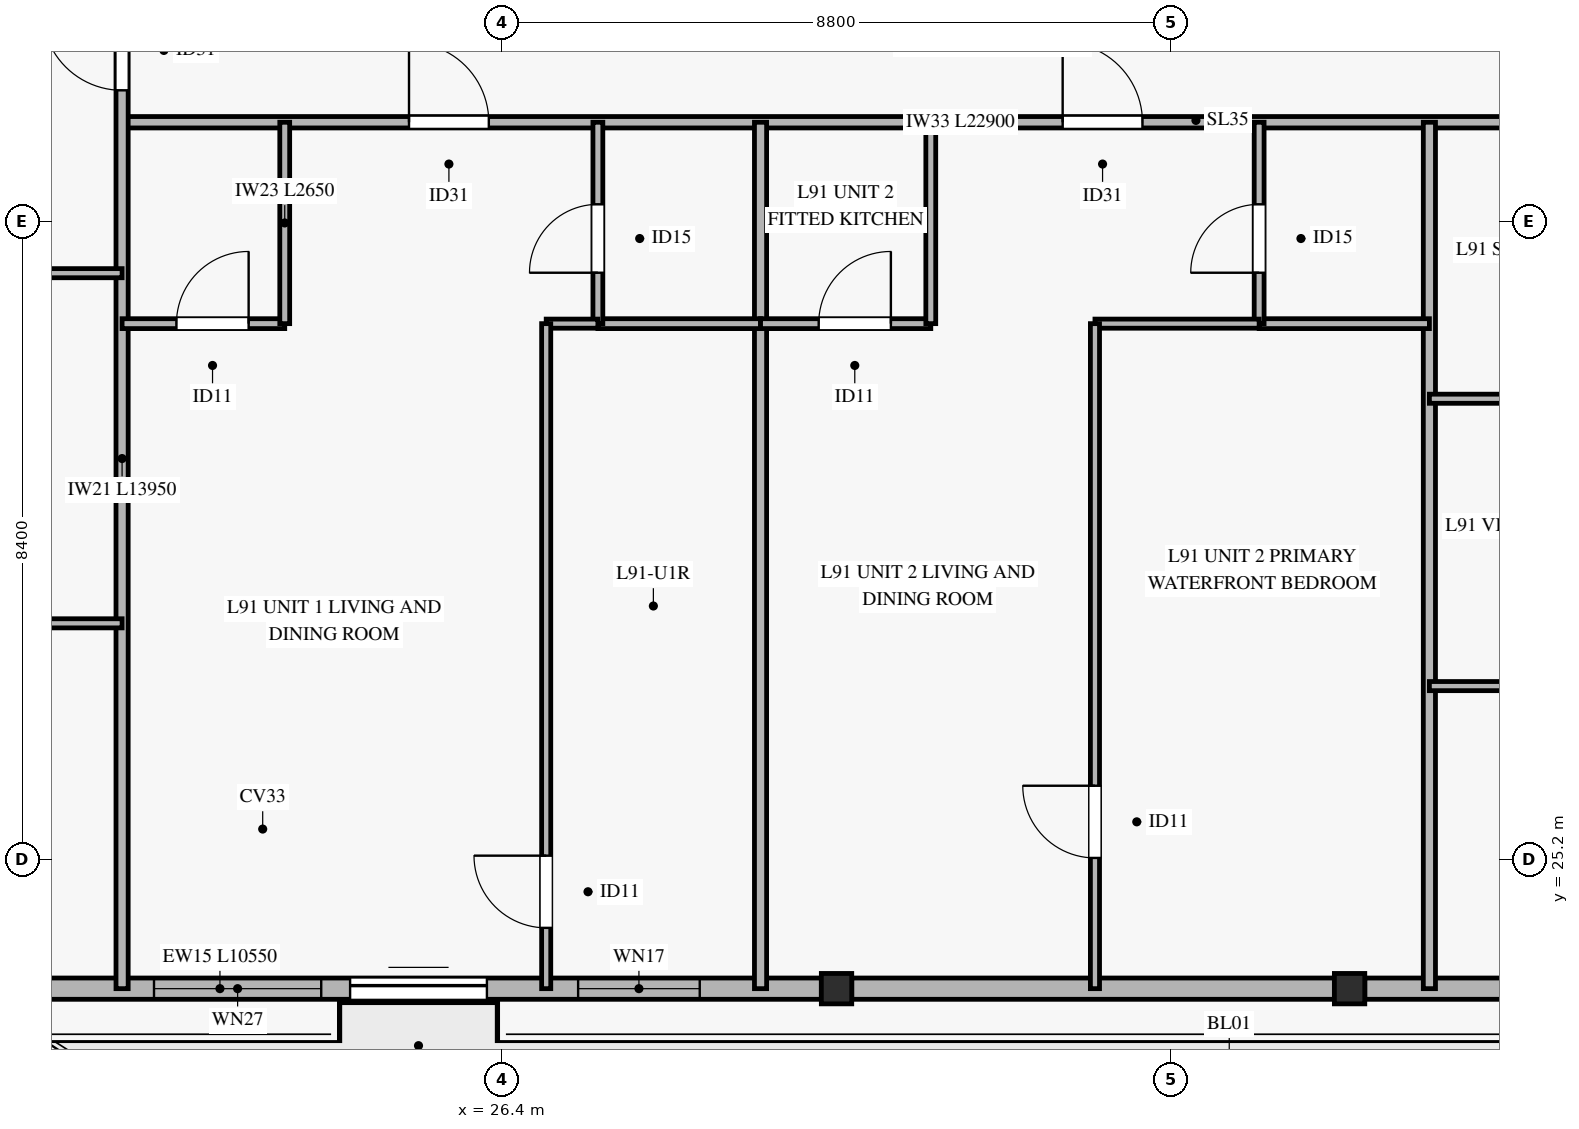
"""IFC4 building model, lengths in metres.
Left out: names, types, materials, properties, quantities, classifications, styles, units other than length and angle.
Written with IfcOpenShell. Run it as: python <this file> out.ifc"""

import sys

from ifc_helpers import new_model, si_unit, direction, frame, frame_2d, origin, origin_2d, place, context, subcontext, project, spatial, rectangle, hollow_rectangle, extrude, source, transform, mapped, element, fill, save


model = new_model("IFC4")
c1 = context("Model", 3, precision=1e-05, world=origin(), true_north=direction((0.0, 1.0)))
c2 = subcontext(c1, "Body", "Model", "MODEL_VIEW")
j1 = project(units=[si_unit("LENGTHUNIT", "METRE"), si_unit("PLANEANGLEUNIT", "RADIAN")], contexts=[c1])
p1 = place(None, origin())
s1 = spatial("IfcSite", under=j1, at=p1, CompositionType="ELEMENT")
p2 = place(p1, origin())
s2 = spatial("IfcBuilding", under=s1, at=p2, CompositionType="ELEMENT")
p3 = place(p2, frame((0.0, 0.0, 349.3)))
s3 = spatial("IfcBuildingStorey", under=s2, at=p3, CompositionType="ELEMENT", Elevation=349.3)
m1 = source(origin(), c2, "Body", "SweptSolid", [
    extrude(hollow_rectangle(XDim=0.4, YDim=0.4, WallThickness=0.02, at=origin_2d()), origin(), (0.0, 0.0, 1.0), 3.08),
])
for number, where, z_axis, x_axis in (
    (1, (30.8, 23.5, 0.0), (0.0, 0.0, 1.0), (1.0, 0.0, 0.0)),
    (2, (37.55, 23.5, 0.0), (0.0, 0.0, 1.0), (1.0, 0.0, 0.0)),
):
    element("IfcColumn", number, at=place(p3, frame(where, z_axis=z_axis, x_axis=x_axis)), inside=s3, PredefinedType="COLUMN", context=c2, shape_type="MappedRepresentation", body=[
        mapped(m1, transform((0.0, 0.0, 0.0), x_axis=(1.0, 0.0, 0.0), y_axis=(0.0, 1.0, 0.0), z_axis=(0.0, 0.0, 1.0), scale=1.0)),
    ])
p4 = place(p3, frame((20.05, 23.5, 0.0), z_axis=(0.0, 0.0, 1.0), x_axis=(1.0, 0.0, 0.0)))
e3 = element("IfcWall", 3, at=p4, inside=s3, PredefinedType="SOLIDWALL", context=c2, shape_type="SweptSolid", body=[
    extrude(rectangle(XDim=10.55, YDim=0.28, at=frame_2d((5.275, 0.0))), origin(), (0.0, 0.0, 1.0), 2.71),
])
p5 = place(p4, frame((4.35, 0.0, 0.0)))
e4 = element("IfcOpeningElement", 4, at=p5, cuts=e3, PredefinedType="OPENING", context=c2, shape_type="SweptSolid", body=[
    extrude(rectangle(XDim=1.8, YDim=2.25, at=frame_2d((0.9, 1.125))), frame((0.0, 0.15, 0.0), z_axis=(0.0, -1.0, 0.0), x_axis=(1.0, 0.0, 0.0)), (0.0, 0.0, 1.0), 0.3),
])
p6 = place(p4, frame((1.77, 0.0, 0.35)))
e5 = element("IfcOpeningElement", 5, at=p6, cuts=e3, PredefinedType="OPENING", context=c2, shape_type="SweptSolid", body=[
    extrude(rectangle(XDim=2.2, YDim=2.1, at=frame_2d((1.1, 1.05))), frame((0.0, 0.15, 0.0), z_axis=(0.0, -1.0, 0.0), x_axis=(1.0, 0.0, 0.0)), (0.0, 0.0, 1.0), 0.3),
])
p7 = place(p4, frame((7.35, 0.0, 0.35)))
e6 = element("IfcOpeningElement", 6, at=p7, cuts=e3, PredefinedType="OPENING", context=c2, shape_type="SweptSolid", body=[
    extrude(rectangle(XDim=1.6, YDim=2.0, at=frame_2d((0.8, 1.0))), frame((0.0, 0.15, 0.0), z_axis=(0.0, -1.0, 0.0), x_axis=(1.0, 0.0, 0.0)), (0.0, 0.0, 1.0), 0.3),
])
for number, where, z_axis, x_axis in (
    (7, (31.0, 23.5, 0.0), (0.0, 0.0, 1.0), (1.0, 0.0, 0.0)),
    (8, (37.75, 23.5, 0.0), (0.0, 0.0, 1.0), (1.0, 0.0, 0.0)),
):
    element("IfcWall", number, at=place(p3, frame(where, z_axis=z_axis, x_axis=x_axis)), inside=s3, PredefinedType="SOLIDWALL", context=c2, shape_type="SweptSolid", body=[
        extrude(rectangle(XDim=6.35, YDim=0.28, at=frame_2d((3.175, 0.0))), origin(), (0.0, 0.0, 1.0), 2.71),
    ])
p8 = place(p3, frame((21.4, 34.9, 0.0), z_axis=(0.0, 0.0, 1.0), x_axis=(1.0, 0.0, 0.0)))
e9 = element("IfcWall", 9, at=p8, inside=s3, PredefinedType="PARTITIONING", context=c2, shape_type="SweptSolid", body=[
    extrude(rectangle(XDim=22.9, YDim=0.15, at=frame_2d((11.45, 0.0))), origin(), (0.0, 0.0, 1.0), 2.365),
])
p9 = place(p8, frame((3.775, 0.0, 0.0)))
e10 = element("IfcOpeningElement", 10, at=p9, cuts=e9, PredefinedType="OPENING", context=c2, shape_type="SweptSolid", body=[
    extrude(rectangle(XDim=1.05, YDim=2.15, at=frame_2d((0.525, 1.075))), frame((0.0, 0.085, 0.0), z_axis=(0.0, -1.0, 0.0), x_axis=(1.0, 0.0, 0.0)), (0.0, 0.0, 1.0), 0.17),
])
p10 = place(p8, frame((12.375, 0.0, 0.0)))
e11 = element("IfcOpeningElement", 11, at=p10, cuts=e9, PredefinedType="OPENING", context=c2, shape_type="SweptSolid", body=[
    extrude(rectangle(XDim=1.05, YDim=2.15, at=frame_2d((0.525, 1.075))), frame((0.0, 0.085, 0.0), z_axis=(0.0, -1.0, 0.0), x_axis=(1.0, 0.0, 0.0)), (0.0, 0.0, 1.0), 0.17),
])
p11 = place(p8, frame((19.535, 0.0, 0.0)))
e12 = element("IfcOpeningElement", 12, at=p11, cuts=e9, PredefinedType="OPENING", context=c2, shape_type="SweptSolid", body=[
    extrude(rectangle(XDim=1.05, YDim=2.15, at=frame_2d((0.525, 1.075))), frame((0.0, 0.085, 0.0), z_axis=(0.0, -1.0, 0.0), x_axis=(1.0, 0.0, 0.0)), (0.0, 0.0, 1.0), 0.17),
])
p12 = place(p3, frame((21.4, 23.5, 0.0), z_axis=(0.0, 0.0, 1.0), x_axis=(0.0, 1.0, 0.0)))
e13 = element("IfcWall", 13, at=p12, inside=s3, PredefinedType="PARTITIONING", context=c2, shape_type="SweptSolid", body=[
    extrude(rectangle(XDim=13.95, YDim=0.16, at=frame_2d((6.975, 0.0))), origin(), (0.0, 0.0, 1.0), 2.665),
])
p13 = place(p12, frame((11.82, 0.0, 0.0)))
e14 = element("IfcOpeningElement", 14, at=p13, cuts=e13, PredefinedType="OPENING", context=c2, shape_type="SweptSolid", body=[
    extrude(rectangle(XDim=1.05, YDim=2.15, at=frame_2d((0.525, 1.075))), frame((0.0, 0.09, 0.0), z_axis=(0.0, -1.0, 0.0), x_axis=(1.0, 0.0, 0.0)), (0.0, 0.0, 1.0), 0.18),
])
for number, where, z_axis, x_axis in (
    (15, (29.8, 23.5, 0.0), (0.0, 0.0, 1.0), (0.0, 1.0, 0.0)),
    (16, (38.6, 23.5, 0.0), (0.0, 0.0, 1.0), (0.0, 1.0, 0.0)),
):
    element("IfcWall", number, at=place(p3, frame(where, z_axis=z_axis, x_axis=x_axis)), inside=s3, PredefinedType="PARTITIONING", context=c2, shape_type="SweptSolid", body=[
        extrude(rectangle(XDim=11.4, YDim=0.16, at=frame_2d((5.7, 0.0))), origin(), (0.0, 0.0, 1.0), 2.665),
    ])
p14 = place(p3, frame((12.1, 28.307, 0.0), z_axis=(0.0, 0.0, 1.0), x_axis=(1.0, 0.0, 0.0)))
e17 = element("IfcWall", 17, at=p14, inside=s3, PredefinedType="PARTITIONING", context=c2, shape_type="SweptSolid", body=[
    extrude(rectangle(XDim=9.3, YDim=0.12, at=frame_2d((4.65, 0.0))), origin(), (0.0, 0.0, 1.0), 2.365),
])
p15 = place(p14, frame((4.006, 0.0, 0.0)))
e18 = element("IfcOpeningElement", 18, at=p15, cuts=e17, PredefinedType="OPENING", context=c2, shape_type="SweptSolid", body=[
    extrude(rectangle(XDim=0.95, YDim=2.1, at=frame_2d((0.475, 1.05))), frame((0.0, 0.07, 0.0), z_axis=(0.0, -1.0, 0.0), x_axis=(1.0, 0.0, 0.0)), (0.0, 0.0, 1.0), 0.14),
])
p16 = place(p3, frame((12.1, 32.914, 0.0), z_axis=(0.0, 0.0, 1.0), x_axis=(1.0, 0.0, 0.0)))
e19 = element("IfcWall", 19, at=p16, inside=s3, PredefinedType="PARTITIONING", context=c2, shape_type="SweptSolid", body=[
    extrude(rectangle(XDim=9.3, YDim=0.12, at=frame_2d((4.65, 0.0))), origin(), (0.0, 0.0, 1.0), 2.365),
])
p17 = place(p16, frame((4.006, 0.0, 0.0)))
e20 = element("IfcOpeningElement", 20, at=p17, cuts=e19, PredefinedType="OPENING", context=c2, shape_type="SweptSolid", body=[
    extrude(rectangle(XDim=0.95, YDim=2.1, at=frame_2d((0.475, 1.05))), frame((0.0, 0.07, 0.0), z_axis=(0.0, -1.0, 0.0), x_axis=(1.0, 0.0, 0.0)), (0.0, 0.0, 1.0), 0.14),
])
p18 = place(p3, frame((21.4, 32.25, 0.0), z_axis=(0.0, 0.0, 1.0), x_axis=(1.0, 0.0, 0.0)))
e21 = element("IfcWall", 21, at=p18, inside=s3, PredefinedType="PARTITIONING", context=c2, shape_type="SweptSolid", body=[
    extrude(rectangle(XDim=2.14, YDim=0.13, at=frame_2d((1.07, 0.0))), origin(), (0.0, 0.0, 1.0), 3.08),
])
p19 = place(p18, frame((0.715, 0.0, 0.0)))
e22 = element("IfcOpeningElement", 22, at=p19, cuts=e21, PredefinedType="OPENING", context=c2, shape_type="SweptSolid", body=[
    extrude(rectangle(XDim=0.95, YDim=2.1, at=frame_2d((0.475, 1.05))), frame((0.0, 0.075, 0.0), z_axis=(0.0, -1.0, 0.0), x_axis=(1.0, 0.0, 0.0)), (0.0, 0.0, 1.0), 0.15),
])
p20 = place(p3, frame((23.54, 32.25, 0.0), z_axis=(0.0, 0.0, 1.0), x_axis=(0.0, 1.0, 0.0)))
e23 = element("IfcWall", 23, at=p20, inside=s3, PredefinedType="PARTITIONING", context=c2, shape_type="SweptSolid", body=[
    extrude(rectangle(XDim=2.65, YDim=0.13, at=frame_2d((1.325, 0.0))), origin(), (0.0, 0.0, 1.0), 2.665),
])
p21 = place(p3, frame((27.66, 32.25, 0.0), z_axis=(0.0, 0.0, 1.0), x_axis=(1.0, 0.0, 0.0)))
e24 = element("IfcWall", 24, at=p21, inside=s3, PredefinedType="PARTITIONING", context=c2, shape_type="SweptSolid", body=[
    extrude(rectangle(XDim=2.14, YDim=0.13, at=frame_2d((1.07, 0.0))), origin(), (0.0, 0.0, 1.0), 3.08),
])
p22 = place(p3, frame((27.66, 32.25, 0.0), z_axis=(0.0, 0.0, 1.0), x_axis=(0.0, 1.0, 0.0)))
e25 = element("IfcWall", 25, at=p22, inside=s3, PredefinedType="PARTITIONING", context=c2, shape_type="SweptSolid", body=[
    extrude(rectangle(XDim=2.65, YDim=0.13, at=frame_2d((1.325, 0.0))), origin(), (0.0, 0.0, 1.0), 2.665),
])
p23 = place(p22, frame((0.67, 0.0, 0.0)))
e26 = element("IfcOpeningElement", 26, at=p23, cuts=e25, PredefinedType="OPENING", context=c2, shape_type="SweptSolid", body=[
    extrude(rectangle(XDim=0.9, YDim=2.1, at=frame_2d((0.45, 1.05))), frame((0.0, 0.075, 0.0), z_axis=(0.0, -1.0, 0.0), x_axis=(1.0, 0.0, 0.0)), (0.0, 0.0, 1.0), 0.15),
])
p24 = place(p3, frame((26.98, 32.25, 0.0), z_axis=(0.0, 0.0, 1.0), x_axis=(1.0, 0.0, 0.0)))
e27 = element("IfcWall", 27, at=p24, inside=s3, PredefinedType="PARTITIONING", context=c2, shape_type="SweptSolid", body=[
    extrude(rectangle(XDim=0.68, YDim=0.12, at=frame_2d((0.34, 0.0))), origin(), (0.0, 0.0, 1.0), 3.08),
])
p25 = place(p3, frame((26.98, 23.5, 0.0), z_axis=(0.0, 0.0, 1.0), x_axis=(0.0, 1.0, 0.0)))
e28 = element("IfcWall", 28, at=p25, inside=s3, PredefinedType="PARTITIONING", context=c2, shape_type="SweptSolid", body=[
    extrude(rectangle(XDim=8.75, YDim=0.12, at=frame_2d((4.375, 0.0))), origin(), (0.0, 0.0, 1.0), 2.665),
])
p26 = place(p25, frame((0.8, 0.0, 0.0)))
e29 = element("IfcOpeningElement", 29, at=p26, cuts=e28, PredefinedType="OPENING", context=c2, shape_type="SweptSolid", body=[
    extrude(rectangle(XDim=0.95, YDim=2.1, at=frame_2d((0.475, 1.05))), frame((0.0, 0.07, 0.0), z_axis=(0.0, -1.0, 0.0), x_axis=(1.0, 0.0, 0.0)), (0.0, 0.0, 1.0), 0.14),
])
p27 = place(p3, frame((29.8, 32.25, 0.0), z_axis=(0.0, 0.0, 1.0), x_axis=(1.0, 0.0, 0.0)))
e30 = element("IfcWall", 30, at=p27, inside=s3, PredefinedType="PARTITIONING", context=c2, shape_type="SweptSolid", body=[
    extrude(rectangle(XDim=2.24, YDim=0.13, at=frame_2d((1.12, 0.0))), origin(), (0.0, 0.0, 1.0), 2.365),
])
p28 = place(p27, frame((0.765, 0.0, 0.0)))
e31 = element("IfcOpeningElement", 31, at=p28, cuts=e30, PredefinedType="OPENING", context=c2, shape_type="SweptSolid", body=[
    extrude(rectangle(XDim=0.95, YDim=2.1, at=frame_2d((0.475, 1.05))), frame((0.0, 0.075, 0.0), z_axis=(0.0, -1.0, 0.0), x_axis=(1.0, 0.0, 0.0)), (0.0, 0.0, 1.0), 0.15),
])
p29 = place(p3, frame((32.04, 32.25, 0.0), z_axis=(0.0, 0.0, 1.0), x_axis=(0.0, 1.0, 0.0)))
e32 = element("IfcWall", 32, at=p29, inside=s3, PredefinedType="PARTITIONING", context=c2, shape_type="SweptSolid", body=[
    extrude(rectangle(XDim=2.65, YDim=0.13, at=frame_2d((1.325, 0.0))), origin(), (0.0, 0.0, 1.0), 2.665),
])
p30 = place(p3, frame((36.36, 32.25, 0.0), z_axis=(0.0, 0.0, 1.0), x_axis=(1.0, 0.0, 0.0)))
e33 = element("IfcWall", 33, at=p30, inside=s3, PredefinedType="PARTITIONING", context=c2, shape_type="SweptSolid", body=[
    extrude(rectangle(XDim=2.24, YDim=0.13, at=frame_2d((1.12, 0.0))), origin(), (0.0, 0.0, 1.0), 2.365),
])
p31 = place(p3, frame((36.36, 32.25, 0.0), z_axis=(0.0, 0.0, 1.0), x_axis=(0.0, 1.0, 0.0)))
e34 = element("IfcWall", 34, at=p31, inside=s3, PredefinedType="PARTITIONING", context=c2, shape_type="SweptSolid", body=[
    extrude(rectangle(XDim=2.65, YDim=0.13, at=frame_2d((1.325, 0.0))), origin(), (0.0, 0.0, 1.0), 2.665),
])
p32 = place(p31, frame((0.67, 0.0, 0.0)))
e35 = element("IfcOpeningElement", 35, at=p32, cuts=e34, PredefinedType="OPENING", context=c2, shape_type="SweptSolid", body=[
    extrude(rectangle(XDim=0.9, YDim=2.1, at=frame_2d((0.45, 1.05))), frame((0.0, 0.075, 0.0), z_axis=(0.0, -1.0, 0.0), x_axis=(1.0, 0.0, 0.0)), (0.0, 0.0, 1.0), 0.15),
])
p33 = place(p3, frame((34.2, 32.25, 0.0), z_axis=(0.0, 0.0, 1.0), x_axis=(1.0, 0.0, 0.0)))
e36 = element("IfcWall", 36, at=p33, inside=s3, PredefinedType="PARTITIONING", context=c2, shape_type="SweptSolid", body=[
    extrude(rectangle(XDim=2.16, YDim=0.12, at=frame_2d((1.08, 0.0))), origin(), (0.0, 0.0, 1.0), 3.08),
])
p34 = place(p3, frame((34.2, 23.5, 0.0), z_axis=(0.0, 0.0, 1.0), x_axis=(0.0, 1.0, 0.0)))
e37 = element("IfcWall", 37, at=p34, inside=s3, PredefinedType="PARTITIONING", context=c2, shape_type="SweptSolid", body=[
    extrude(rectangle(XDim=8.75, YDim=0.12, at=frame_2d((4.375, 0.0))), origin(), (0.0, 0.0, 1.0), 2.665),
])
p35 = place(p34, frame((1.72, 0.0, 0.0)))
e38 = element("IfcOpeningElement", 38, at=p35, cuts=e37, PredefinedType="OPENING", context=c2, shape_type="SweptSolid", body=[
    extrude(rectangle(XDim=0.95, YDim=2.1, at=frame_2d((0.475, 1.05))), frame((0.0, 0.07, 0.0), z_axis=(0.0, -1.0, 0.0), x_axis=(1.0, 0.0, 0.0)), (0.0, 0.0, 1.0), 0.14),
])
p36 = place(p3, frame((38.6, 27.481, 0.0), z_axis=(0.0, 0.0, 1.0), x_axis=(1.0, 0.0, 0.0)))
e39 = element("IfcWall", 39, at=p36, inside=s3, PredefinedType="PARTITIONING", context=c2, shape_type="SweptSolid", body=[
    extrude(rectangle(XDim=5.7, YDim=0.12, at=frame_2d((2.85, 0.0))), origin(), (0.0, 0.0, 1.0), 2.365),
])
p37 = place(p36, frame((2.446, 0.0, 0.0)))
e40 = element("IfcOpeningElement", 40, at=p37, cuts=e39, PredefinedType="OPENING", context=c2, shape_type="SweptSolid", body=[
    extrude(rectangle(XDim=0.95, YDim=2.1, at=frame_2d((0.475, 1.05))), frame((0.0, 0.07, 0.0), z_axis=(0.0, -1.0, 0.0), x_axis=(1.0, 0.0, 0.0)), (0.0, 0.0, 1.0), 0.14),
])
p38 = place(p3, frame((38.6, 31.262, 0.0), z_axis=(0.0, 0.0, 1.0), x_axis=(1.0, 0.0, 0.0)))
e41 = element("IfcWall", 41, at=p38, inside=s3, PredefinedType="PARTITIONING", context=c2, shape_type="SweptSolid", body=[
    extrude(rectangle(XDim=5.7, YDim=0.12, at=frame_2d((2.85, 0.0))), origin(), (0.0, 0.0, 1.0), 2.365),
])
p39 = place(p38, frame((2.446, 0.0, 0.0)))
e42 = element("IfcOpeningElement", 42, at=p39, cuts=e41, PredefinedType="OPENING", context=c2, shape_type="SweptSolid", body=[
    extrude(rectangle(XDim=0.95, YDim=2.1, at=frame_2d((0.475, 1.05))), frame((0.0, 0.07, 0.0), z_axis=(0.0, -1.0, 0.0), x_axis=(1.0, 0.0, 0.0)), (0.0, 0.0, 1.0), 0.14),
])
m2 = source(origin(), c2, "Body", "SweptSolid", [
    extrude(rectangle(XDim=1.8, YDim=2.25, at=frame_2d((0.9, 1.125))), frame((0.0, 0.025, 0.0), z_axis=(0.0, -1.0, 0.0), x_axis=(1.0, 0.0, 0.0)), (0.0, 0.0, 1.0), 0.05),
])
p40 = place(p5, origin())
e43 = element("IfcDoor", 43, at=p40, inside=s3, OperationType="SLIDING_TO_LEFT", PredefinedType="DOOR", context=c2, shape_type="MappedRepresentation", body=[
    mapped(m2, transform((0.0, 0.0, 0.0), x_axis=(1.0, 0.0, 0.0), y_axis=(0.0, 1.0, 0.0), z_axis=(0.0, 0.0, 1.0), scale=1.0)),
])
fill(e4, e43)
m3 = source(origin(), c2, "Body", "SweptSolid", [
    extrude(rectangle(XDim=2.2, YDim=2.1, at=frame_2d((1.1, 1.05))), frame((0.0, 0.03, 0.0), z_axis=(0.0, -1.0, 0.0), x_axis=(1.0, 0.0, 0.0)), (0.0, 0.0, 1.0), 0.06),
])
p41 = place(p6, origin())
e44 = element("IfcWindow", 44, at=p41, inside=s3, PartitioningType="SINGLE_PANEL", PredefinedType="WINDOW", context=c2, shape_type="MappedRepresentation", body=[
    mapped(m3, transform((0.0, 0.0, 0.0), x_axis=(1.0, 0.0, 0.0), y_axis=(0.0, 1.0, 0.0), z_axis=(0.0, 0.0, 1.0), scale=1.0)),
])
fill(e5, e44)
m4 = source(origin(), c2, "Body", "SweptSolid", [
    extrude(rectangle(XDim=1.6, YDim=2.0, at=frame_2d((0.8, 1.0))), frame((0.0, 0.03, 0.0), z_axis=(0.0, -1.0, 0.0), x_axis=(1.0, 0.0, 0.0)), (0.0, 0.0, 1.0), 0.06),
])
p42 = place(p7, origin())
e45 = element("IfcWindow", 45, at=p42, inside=s3, PartitioningType="SINGLE_PANEL", PredefinedType="WINDOW", context=c2, shape_type="MappedRepresentation", body=[
    mapped(m4, transform((0.0, 0.0, 0.0), x_axis=(1.0, 0.0, 0.0), y_axis=(0.0, 1.0, 0.0), z_axis=(0.0, 0.0, 1.0), scale=1.0)),
])
fill(e6, e45)
m5 = source(origin(), c2, "Body", "SweptSolid", [
    extrude(rectangle(XDim=1.05, YDim=2.15, at=frame_2d((0.525, 1.075))), frame((0.0, 0.025, 0.0), z_axis=(0.0, -1.0, 0.0), x_axis=(1.0, 0.0, 0.0)), (0.0, 0.0, 1.0), 0.05),
])
p43 = place(p13, origin())
e46 = element("IfcDoor", 46, at=p43, inside=s3, OperationType="SINGLE_SWING_RIGHT", PredefinedType="DOOR", context=c2, shape_type="MappedRepresentation", body=[
    mapped(m5, transform((0.0, 0.0, 0.0), x_axis=(1.0, 0.0, 0.0), y_axis=(0.0, 1.0, 0.0), z_axis=(0.0, 0.0, 1.0), scale=1.0)),
])
fill(e14, e46)
p44 = place(p9, origin())
e47 = element("IfcDoor", 47, at=p44, inside=s3, OperationType="SINGLE_SWING_LEFT", PredefinedType="DOOR", context=c2, shape_type="MappedRepresentation", body=[
    mapped(m5, transform((0.0, 0.0, 0.0), x_axis=(1.0, 0.0, 0.0), y_axis=(0.0, 1.0, 0.0), z_axis=(0.0, 0.0, 1.0), scale=1.0)),
])
fill(e10, e47)
m6 = source(origin(), c2, "Body", "SweptSolid", [
    extrude(rectangle(XDim=0.95, YDim=2.1, at=frame_2d((0.475, 1.05))), frame((0.0, 0.025, 0.0), z_axis=(0.0, -1.0, 0.0), x_axis=(1.0, 0.0, 0.0)), (0.0, 0.0, 1.0), 0.05),
])
p45 = place(p19, origin())
e48 = element("IfcDoor", 48, at=p45, inside=s3, OperationType="SINGLE_SWING_RIGHT", PredefinedType="DOOR", context=c2, shape_type="MappedRepresentation", body=[
    mapped(m6, transform((0.0, 0.0, 0.0), x_axis=(1.0, 0.0, 0.0), y_axis=(0.0, 1.0, 0.0), z_axis=(0.0, 0.0, 1.0), scale=1.0)),
])
fill(e22, e48)
m7 = source(origin(), c2, "Body", "SweptSolid", [
    extrude(rectangle(XDim=0.9, YDim=2.1, at=frame_2d((0.45, 1.05))), frame((0.0, 0.025, 0.0), z_axis=(0.0, -1.0, 0.0), x_axis=(1.0, 0.0, 0.0)), (0.0, 0.0, 1.0), 0.05),
])
p46 = place(p23, origin())
e49 = element("IfcDoor", 49, at=p46, inside=s3, OperationType="SINGLE_SWING_LEFT", PredefinedType="DOOR", context=c2, shape_type="MappedRepresentation", body=[
    mapped(m7, transform((0.0, 0.0, 0.0), x_axis=(1.0, 0.0, 0.0), y_axis=(0.0, 1.0, 0.0), z_axis=(0.0, 0.0, 1.0), scale=1.0)),
])
fill(e26, e49)
p47 = place(p26, origin())
e50 = element("IfcDoor", 50, at=p47, inside=s3, OperationType="SINGLE_SWING_RIGHT", PredefinedType="DOOR", context=c2, shape_type="MappedRepresentation", body=[
    mapped(m6, transform((0.0, 0.0, 0.0), x_axis=(1.0, 0.0, 0.0), y_axis=(0.0, 1.0, 0.0), z_axis=(0.0, 0.0, 1.0), scale=1.0)),
])
fill(e29, e50)
p48 = place(p10, origin())
e51 = element("IfcDoor", 51, at=p48, inside=s3, OperationType="SINGLE_SWING_LEFT", PredefinedType="DOOR", context=c2, shape_type="MappedRepresentation", body=[
    mapped(m5, transform((0.0, 0.0, 0.0), x_axis=(1.0, 0.0, 0.0), y_axis=(0.0, 1.0, 0.0), z_axis=(0.0, 0.0, 1.0), scale=1.0)),
])
fill(e11, e51)
p49 = place(p28, origin())
e52 = element("IfcDoor", 52, at=p49, inside=s3, OperationType="SINGLE_SWING_RIGHT", PredefinedType="DOOR", context=c2, shape_type="MappedRepresentation", body=[
    mapped(m6, transform((0.0, 0.0, 0.0), x_axis=(1.0, 0.0, 0.0), y_axis=(0.0, 1.0, 0.0), z_axis=(0.0, 0.0, 1.0), scale=1.0)),
])
fill(e31, e52)
p50 = place(p32, origin())
e53 = element("IfcDoor", 53, at=p50, inside=s3, OperationType="SINGLE_SWING_LEFT", PredefinedType="DOOR", context=c2, shape_type="MappedRepresentation", body=[
    mapped(m7, transform((0.0, 0.0, 0.0), x_axis=(1.0, 0.0, 0.0), y_axis=(0.0, 1.0, 0.0), z_axis=(0.0, 0.0, 1.0), scale=1.0)),
])
fill(e35, e53)
p51 = place(p35, origin())
e54 = element("IfcDoor", 54, at=p51, inside=s3, OperationType="SINGLE_SWING_RIGHT", PredefinedType="DOOR", context=c2, shape_type="MappedRepresentation", body=[
    mapped(m6, transform((0.0, 0.0, 0.0), x_axis=(1.0, 0.0, 0.0), y_axis=(0.0, 1.0, 0.0), z_axis=(0.0, 0.0, 1.0), scale=1.0)),
])
fill(e38, e54)
save(model, sys.argv[1])
